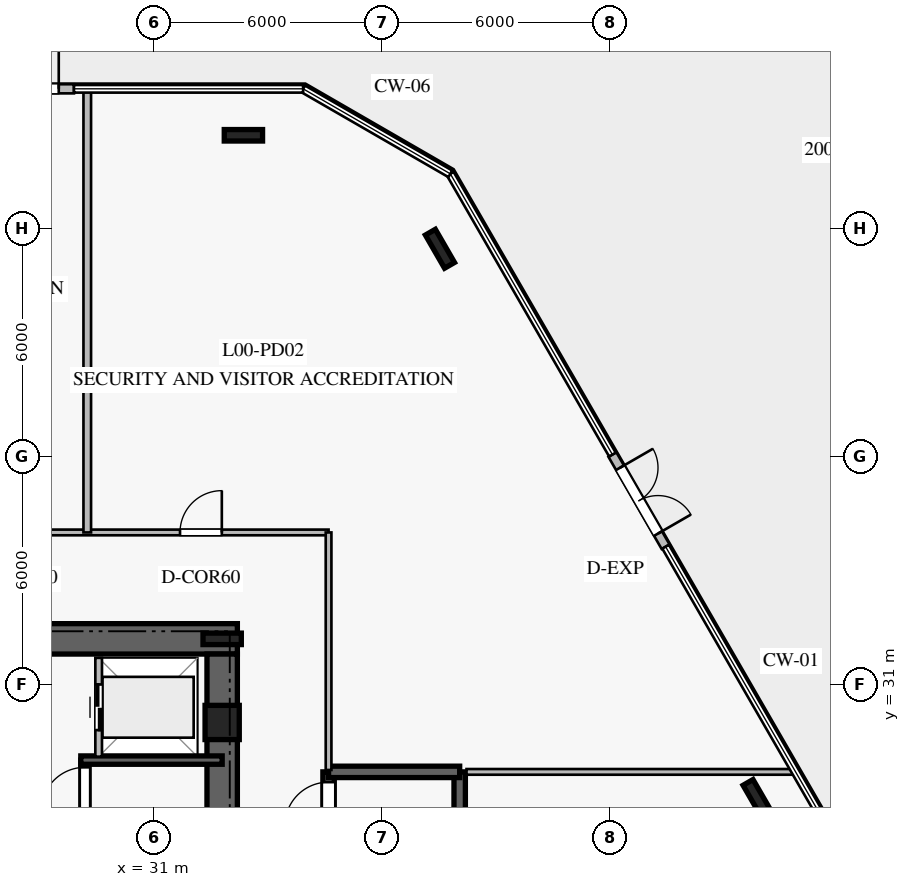
"""IFC4 building model, lengths in metres.
Left out: names, types, materials, properties, quantities, classifications, styles, units other than length and angle.
Written with IfcOpenShell. Run it as: python <this file> out.ifc"""

import sys

from ifc_helpers import new_model, si_unit, direction, frame, frame_2d, origin, origin_2d, place, context, subcontext, project, spatial, rectangle, i_section, extrude, element, fill, save


model = new_model("IFC4")
c1 = context("Model", 3, precision=1e-05, world=origin(), true_north=direction((0.0, 1.0)))
c2 = subcontext(c1, "Body", "Model", "MODEL_VIEW")
j1 = project(units=[si_unit("LENGTHUNIT", "METRE"), si_unit("PLANEANGLEUNIT", "RADIAN")], contexts=[c1])
p1 = place(None, origin())
s1 = spatial("IfcSite", under=j1, at=p1, CompositionType="ELEMENT")
p2 = place(p1, origin())
s2 = spatial("IfcBuilding", under=s1, at=p2, CompositionType="ELEMENT")
p3 = place(p2, origin())
s3 = spatial("IfcBuildingStorey", under=s2, at=p3, CompositionType="ELEMENT", Elevation=0.0)
p4 = place(p3, frame((33.2, 32.2, 0.0), z_axis=(0.0, 0.0, 1.0), x_axis=(-1.0, 0.0, 0.0)))
e1 = element("IfcWall", 1, at=p4, inside=s3, PredefinedType="SHEAR", context=c2, shape_type="SweptSolid", body=[
    extrude(rectangle(XDim=16.4, YDim=0.8, at=frame_2d((8.2, 0.0))), origin(), (0.0, 0.0, 1.0), 4.94),
])
p5 = place(p4, frame((5.15, 0.0, 0.0)))
e2 = element("IfcOpeningElement", 2, at=p5, cuts=e1, PredefinedType="OPENING", context=c2, shape_type="SweptSolid", body=[
    extrude(rectangle(XDim=1.2, YDim=2.25, at=frame_2d((0.6, 1.125))), frame((0.0, 0.41, 0.0), z_axis=(0.0, -1.0, 0.0), x_axis=(1.0, 0.0, 0.0)), (0.0, 0.0, 1.0), 0.82),
])
p6 = place(p4, frame((11.95, 0.0, 0.0)))
e3 = element("IfcOpeningElement", 3, at=p6, cuts=e1, PredefinedType="OPENING", context=c2, shape_type="SweptSolid", body=[
    extrude(rectangle(XDim=1.1, YDim=2.2, at=frame_2d((0.55, 1.1))), frame((0.0, 0.41, 0.0), z_axis=(0.0, -1.0, 0.0), x_axis=(1.0, 0.0, 0.0)), (0.0, 0.0, 1.0), 0.82),
])
p7 = place(p4, frame((9.975, 0.0, 0.0)))
e4 = element("IfcOpeningElement", 4, at=p7, cuts=e1, PredefinedType="OPENING", context=c2, shape_type="SweptSolid", body=[
    extrude(rectangle(XDim=1.1, YDim=2.2, at=frame_2d((0.55, 1.1))), frame((0.0, 0.41, 0.0), z_axis=(0.0, -1.0, 0.0), x_axis=(1.0, 0.0, 0.0)), (0.0, 0.0, 1.0), 0.82),
])
p8 = place(p4, frame((8.0, 0.0, 0.0)))
e5 = element("IfcOpeningElement", 5, at=p8, cuts=e1, PredefinedType="OPENING", context=c2, shape_type="SweptSolid", body=[
    extrude(rectangle(XDim=1.1, YDim=2.2, at=frame_2d((0.55, 1.1))), frame((0.0, 0.41, 0.0), z_axis=(0.0, -1.0, 0.0), x_axis=(1.0, 0.0, 0.0)), (0.0, 0.0, 1.0), 0.82),
])
p9 = place(p3, frame((32.8, 18.2, 0.0), z_axis=(0.0, 0.0, 1.0), x_axis=(0.0, 1.0, 0.0)))
e6 = element("IfcWall", 6, at=p9, inside=s3, PredefinedType="SHEAR", context=c2, shape_type="SweptSolid", body=[
    extrude(rectangle(XDim=13.6, YDim=0.8, at=frame_2d((6.8, 0.0))), origin(), (0.0, 0.0, 1.0), 4.94),
])
p10 = place(p3, frame((32.8, 32.2, 0.0), z_axis=(0.0, 0.0, 1.0), x_axis=(1.0, 0.0, 0.0)))
e7 = element("IfcColumn", 7, at=p10, inside=s3, PredefinedType="COLUMN", context=c2, shape_type="SweptSolid", body=[
    extrude(i_section(OverallWidth=0.302, OverallDepth=1.008, WebThickness=0.021, FlangeThickness=0.04, at=origin_2d()), origin(), (0.0, 0.0, 1.0), 5.2),
])
p11 = place(p3, frame((29.19, 21.79, 0.0), z_axis=(0.0, 0.0, 1.0), x_axis=(0.0, 1.0, 0.0)))
e8 = element("IfcWall", 8, at=p11, inside=s3, PredefinedType="SOLIDWALL", context=c2, shape_type="SweptSolid", body=[
    extrude(rectangle(XDim=7.22, YDim=0.22, at=frame_2d((3.61, 0.0))), origin(), (0.0, 0.0, 1.0), 4.94),
])
p12 = place(p11, frame((5.88, 0.0, 0.0)))
e9 = element("IfcOpeningElement", 9, at=p12, cuts=e8, PredefinedType="OPENING", context=c2, shape_type="SweptSolid", body=[
    extrude(rectangle(XDim=1.15, YDim=2.2, at=frame_2d((0.575, 1.1))), frame((0.0, 0.12, 0.0), z_axis=(0.0, -1.0, 0.0), x_axis=(1.0, 0.0, 0.0)), (0.0, 0.0, 1.0), 0.24),
])
p13 = place(p3, frame((29.08, 29.01, 0.0), z_axis=(0.0, 0.0, 1.0), x_axis=(1.0, 0.0, 0.0)))
e10 = element("IfcWall", 10, at=p13, inside=s3, PredefinedType="SOLIDWALL", context=c2, shape_type="SweptSolid", body=[
    extrude(rectangle(XDim=3.72, YDim=0.22, at=frame_2d((1.86, 0.0))), origin(), (0.0, 0.0, 1.0), 4.94),
])
p14 = place(p3, frame((35.6, 21.3, 0.0), z_axis=(0.0, 0.0, 1.0), x_axis=(0.0, 1.0, 0.0)))
e11 = element("IfcWall", 11, at=p14, inside=s3, PredefinedType="SOLIDWALL", context=c2, shape_type="SweptSolid", body=[
    extrude(rectangle(XDim=7.4, YDim=0.3, at=frame_2d((3.7, 0.0))), origin(), (0.0, 0.0, 1.0), 4.94),
])
p15 = place(p14, frame((5.98, 0.0, 0.0)))
e12 = element("IfcOpeningElement", 12, at=p15, cuts=e11, PredefinedType="OPENING", context=c2, shape_type="SweptSolid", body=[
    extrude(rectangle(XDim=1.15, YDim=2.2, at=frame_2d((0.575, 1.1))), frame((0.0, 0.16, 0.0), z_axis=(0.0, -1.0, 0.0), x_axis=(1.0, 0.0, 0.0)), (0.0, 0.0, 1.0), 0.32),
])
p16 = place(p3, frame((39.05, 21.3, 0.0), z_axis=(0.0, 0.0, 1.0), x_axis=(0.0, 1.0, 0.0)))
e13 = element("IfcWall", 13, at=p16, inside=s3, PredefinedType="SOLIDWALL", context=c2, shape_type="SweptSolid", body=[
    extrude(rectangle(XDim=7.4, YDim=0.3, at=frame_2d((3.7, 0.0))), origin(), (0.0, 0.0, 1.0), 4.94),
])
p17 = place(p3, frame((35.6, 28.7, 0.0), z_axis=(0.0, 0.0, 1.0), x_axis=(1.0, 0.0, 0.0)))
e14 = element("IfcWall", 14, at=p17, inside=s3, PredefinedType="SOLIDWALL", context=c2, shape_type="SweptSolid", body=[
    extrude(rectangle(XDim=3.45, YDim=0.3, at=frame_2d((1.725, 0.0))), origin(), (0.0, 0.0, 1.0), 4.94),
])
for number, where, z_axis, x_axis in (
    (15, (46.89, 27.986, 0.0), (0.0, 0.0, 1.0), (-0.5, 0.866, 0.0)),
    (16, (38.531, 42.464, 0.0), (0.0, 0.0, 1.0), (-0.5, 0.866, 0.0)),
    (17, (33.359, 45.45, 0.0), (0.0, 0.0, 1.0), (1.0, 0.0, 0.0)),
):
    element("IfcColumn", number, at=place(p3, frame(where, z_axis=z_axis, x_axis=x_axis)), inside=s3, PredefinedType="COLUMN", context=c2, shape_type="SweptSolid", body=[
        extrude(i_section(OverallWidth=0.302, OverallDepth=1.008, WebThickness=0.021, FlangeThickness=0.04, at=origin_2d()), origin(), (0.0, 0.0, 1.0), 5.2),
    ])
p18 = place(p3, frame((32.8, 30.0, 0.0), z_axis=(0.0, 0.0, 1.0), x_axis=(1.0, 0.0, 0.0)))
e18 = element("IfcColumn", 18, at=p18, inside=s3, PredefinedType="PILASTER", context=c2, shape_type="SweptSolid", body=[
    extrude(rectangle(XDim=0.9, YDim=0.9, at=origin_2d()), origin(), (0.0, 0.0, 1.0), 5.2),
])
p19 = place(p3, frame((44.469, 34.624, 0.0), z_axis=(0.0, 0.0, 1.0), x_axis=(-0.49994636267, 0.866056369097, 0.0)))
e19 = element("IfcWall", 19, at=p19, inside=s3, PredefinedType="STANDARD", context=c2, shape_type="SweptSolid", body=[
    extrude(rectangle(XDim=2.8, YDim=0.24, at=frame_2d((1.4, 0.0))), origin(), (0.0, 0.0, 1.0), 4.94),
])
p20 = place(p19, frame((0.4, 0.0, 0.0)))
e20 = element("IfcOpeningElement", 20, at=p20, cuts=e19, PredefinedType="OPENING", context=c2, shape_type="SweptSolid", body=[
    extrude(rectangle(XDim=2.0, YDim=2.4, at=frame_2d((1.0, 1.2))), frame((0.0, 0.13, 0.0), z_axis=(0.0, -1.0, 0.0), x_axis=(1.0, 0.0, 0.0)), (0.0, 0.0, 1.0), 0.26),
])
p21 = place(p3, frame((28.9, 46.673, 0.0), z_axis=(0.0, 0.0, 1.0), x_axis=(-1.0, 0.0, 0.0)))
e21 = element("IfcWall", 21, at=p21, inside=s3, PredefinedType="STANDARD", context=c2, shape_type="SweptSolid", body=[
    extrude(rectangle(XDim=2.8, YDim=0.24, at=frame_2d((1.4, 0.0))), origin(), (0.0, 0.0, 1.0), 4.94),
])
p22 = place(p21, frame((0.4, 0.0, 0.0)))
e22 = element("IfcOpeningElement", 22, at=p22, cuts=e21, PredefinedType="OPENING", context=c2, shape_type="SweptSolid", body=[
    extrude(rectangle(XDim=2.0, YDim=2.4, at=frame_2d((1.0, 1.2))), frame((0.0, 0.13, 0.0), z_axis=(0.0, -1.0, 0.0), x_axis=(1.0, 0.0, 0.0)), (0.0, 0.0, 1.0), 0.26),
])
p23 = place(p3, frame((29.55, 29.1, 0.0), z_axis=(0.0, 0.0, 1.0), x_axis=(0.0, 1.0, 0.0)))
e23 = element("IfcWall", 23, at=p23, inside=s3, PredefinedType="PARTITIONING", context=c2, shape_type="SweptSolid", body=[
    extrude(rectangle(XDim=2.6, YDim=0.175, at=frame_2d((1.3, 0.0))), origin(), (0.0, 0.0, 1.0), 4.94),
])
p24 = place(p23, frame((0.7, 0.0, 0.0)))
e24 = element("IfcOpeningElement", 24, at=p24, cuts=e23, PredefinedType="OPENING", context=c2, shape_type="SweptSolid", body=[
    extrude(rectangle(XDim=1.2, YDim=2.2, at=frame_2d((0.6, 1.1))), frame((0.0, 0.098, 0.0), z_axis=(0.0, -1.0, 0.0), x_axis=(1.0, 0.0, 0.0)), (0.0, 0.0, 1.0), 0.195),
])
p25 = place(p3, frame((14.4, 35.0, 0.0), z_axis=(0.0, 0.0, 1.0), x_axis=(1.0, 0.0, 0.0)))
e25 = element("IfcWall", 25, at=p25, inside=s3, PredefinedType="PARTITIONING", context=c2, shape_type="SweptSolid", body=[
    extrude(rectangle(XDim=21.2, YDim=0.15, at=frame_2d((10.6, 0.0))), origin(), (0.0, 0.0, 1.0), 4.39),
])
p26 = place(p25, frame((12.5, 0.0, 0.0)))
e26 = element("IfcOpeningElement", 26, at=p26, cuts=e25, PredefinedType="OPENING", context=c2, shape_type="SweptSolid", body=[
    extrude(rectangle(XDim=1.2, YDim=2.25, at=frame_2d((0.6, 1.125))), frame((0.0, 0.085, 0.0), z_axis=(0.0, -1.0, 0.0), x_axis=(1.0, 0.0, 0.0)), (0.0, 0.0, 1.0), 0.17),
])
p27 = place(p25, frame((2.12, 0.0, 0.0)))
e27 = element("IfcOpeningElement", 27, at=p27, cuts=e25, PredefinedType="OPENING", context=c2, shape_type="SweptSolid", body=[
    extrude(rectangle(XDim=0.95, YDim=2.1, at=frame_2d((0.475, 1.05))), frame((0.0, 0.085, 0.0), z_axis=(0.0, -1.0, 0.0), x_axis=(1.0, 0.0, 0.0)), (0.0, 0.0, 1.0), 0.17),
])
p28 = place(p25, frame((8.088, 0.0, 0.0)))
e28 = element("IfcOpeningElement", 28, at=p28, cuts=e25, PredefinedType="OPENING", context=c2, shape_type="SweptSolid", body=[
    extrude(rectangle(XDim=1.2, YDim=2.25, at=frame_2d((0.6, 1.125))), frame((0.0, 0.085, 0.0), z_axis=(0.0, -1.0, 0.0), x_axis=(1.0, 0.0, 0.0)), (0.0, 0.0, 1.0), 0.17),
])
p29 = place(p25, frame((17.291, 0.0, 0.0)))
e29 = element("IfcOpeningElement", 29, at=p29, cuts=e25, PredefinedType="OPENING", context=c2, shape_type="SweptSolid", body=[
    extrude(rectangle(XDim=1.1, YDim=2.2, at=frame_2d((0.55, 1.1))), frame((0.0, 0.085, 0.0), z_axis=(0.0, -1.0, 0.0), x_axis=(1.0, 0.0, 0.0)), (0.0, 0.0, 1.0), 0.17),
])
p30 = place(p3, frame((35.6, 28.75, 0.0), z_axis=(0.0, 0.0, 1.0), x_axis=(0.0, 1.0, 0.0)))
e30 = element("IfcWall", 30, at=p30, inside=s3, PredefinedType="PARTITIONING", context=c2, shape_type="SweptSolid", body=[
    extrude(rectangle(XDim=6.25, YDim=0.15, at=frame_2d((3.125, 0.0))), origin(), (0.0, 0.0, 1.0), 4.39),
])
p31 = place(p3, frame((29.25, 35.0, 0.0), z_axis=(0.0, 0.0, 1.0), x_axis=(0.0, 1.0, 0.0)))
e31 = element("IfcWall", 31, at=p31, inside=s3, PredefinedType="PARTITIONING", context=c2, shape_type="SweptSolid", body=[
    extrude(rectangle(XDim=11.65, YDim=0.2, at=frame_2d((5.825, 0.0))), origin(), (0.0, 0.0, 1.0), 4.24),
])
p32 = place(p3, frame((39.23, 28.7, 0.0), z_axis=(0.0, 0.0, 1.0), x_axis=(1.0, 0.0, 0.0)))
e32 = element("IfcWall", 32, at=p32, inside=s3, PredefinedType="PARTITIONING", context=c2, shape_type="SweptSolid", body=[
    extrude(rectangle(XDim=8.69, YDim=0.15, at=frame_2d((4.345, 0.0))), origin(), (0.0, 0.0, 1.0), 4.24),
])
p33 = place(p20, frame((2.0, 0.0, 0.0), z_axis=(0.0, 0.0, 1.0), x_axis=(-1.0, 0.0, 0.0)))
e33 = element("IfcDoor", 33, at=p33, inside=s3, OperationType="DOUBLE_DOOR_SINGLE_SWING", PredefinedType="DOOR", context=c2, shape_type="SweptSolid", body=[
    extrude(rectangle(XDim=2.0, YDim=2.4, at=frame_2d((1.0, 1.2))), frame((0.0, 0.025, 0.0), z_axis=(0.0, -1.0, 0.0), x_axis=(1.0, 0.0, 0.0)), (0.0, 0.0, 1.0), 0.05),
])
fill(e20, e33)
p34 = place(p22, frame((2.0, 0.0, 0.0), z_axis=(0.0, 0.0, 1.0), x_axis=(-1.0, 0.0, 0.0)))
e34 = element("IfcDoor", 34, at=p34, inside=s3, OperationType="DOUBLE_DOOR_SINGLE_SWING", PredefinedType="DOOR", context=c2, shape_type="SweptSolid", body=[
    extrude(rectangle(XDim=2.0, YDim=2.4, at=frame_2d((1.0, 1.2))), frame((0.0, 0.025, 0.0), z_axis=(0.0, -1.0, 0.0), x_axis=(1.0, 0.0, 0.0)), (0.0, 0.0, 1.0), 0.05),
])
fill(e22, e34)
p35 = place(p12, origin())
e35 = element("IfcDoor", 35, at=p35, inside=s3, OperationType="SINGLE_SWING_LEFT", PredefinedType="DOOR", context=c2, shape_type="SweptSolid", body=[
    extrude(rectangle(XDim=1.15, YDim=2.2, at=frame_2d((0.575, 1.1))), frame((0.0, 0.025, 0.0), z_axis=(0.0, -1.0, 0.0), x_axis=(1.0, 0.0, 0.0)), (0.0, 0.0, 1.0), 0.05),
])
fill(e9, e35)
p36 = place(p24, origin())
e36 = element("IfcDoor", 36, at=p36, inside=s3, OperationType="DOUBLE_DOOR_SLIDING", PredefinedType="DOOR", context=c2, shape_type="SweptSolid", body=[
    extrude(rectangle(XDim=1.2, YDim=2.2, at=frame_2d((0.6, 1.1))), frame((0.0, 0.025, 0.0), z_axis=(0.0, -1.0, 0.0), x_axis=(1.0, 0.0, 0.0)), (0.0, 0.0, 1.0), 0.05),
])
fill(e24, e36)
p37 = place(p15, origin())
e37 = element("IfcDoor", 37, at=p37, inside=s3, OperationType="SINGLE_SWING_LEFT", PredefinedType="DOOR", context=c2, shape_type="SweptSolid", body=[
    extrude(rectangle(XDim=1.15, YDim=2.2, at=frame_2d((0.575, 1.1))), frame((0.0, 0.025, 0.0), z_axis=(0.0, -1.0, 0.0), x_axis=(1.0, 0.0, 0.0)), (0.0, 0.0, 1.0), 0.05),
])
fill(e12, e37)
p38 = place(p29, origin())
e38 = element("IfcDoor", 38, at=p38, inside=s3, OperationType="SINGLE_SWING_RIGHT", PredefinedType="DOOR", context=c2, shape_type="SweptSolid", body=[
    extrude(rectangle(XDim=1.1, YDim=2.2, at=frame_2d((0.55, 1.1))), frame((0.0, 0.025, 0.0), z_axis=(0.0, -1.0, 0.0), x_axis=(1.0, 0.0, 0.0)), (0.0, 0.0, 1.0), 0.05),
])
fill(e29, e38)
save(model, sys.argv[1])
